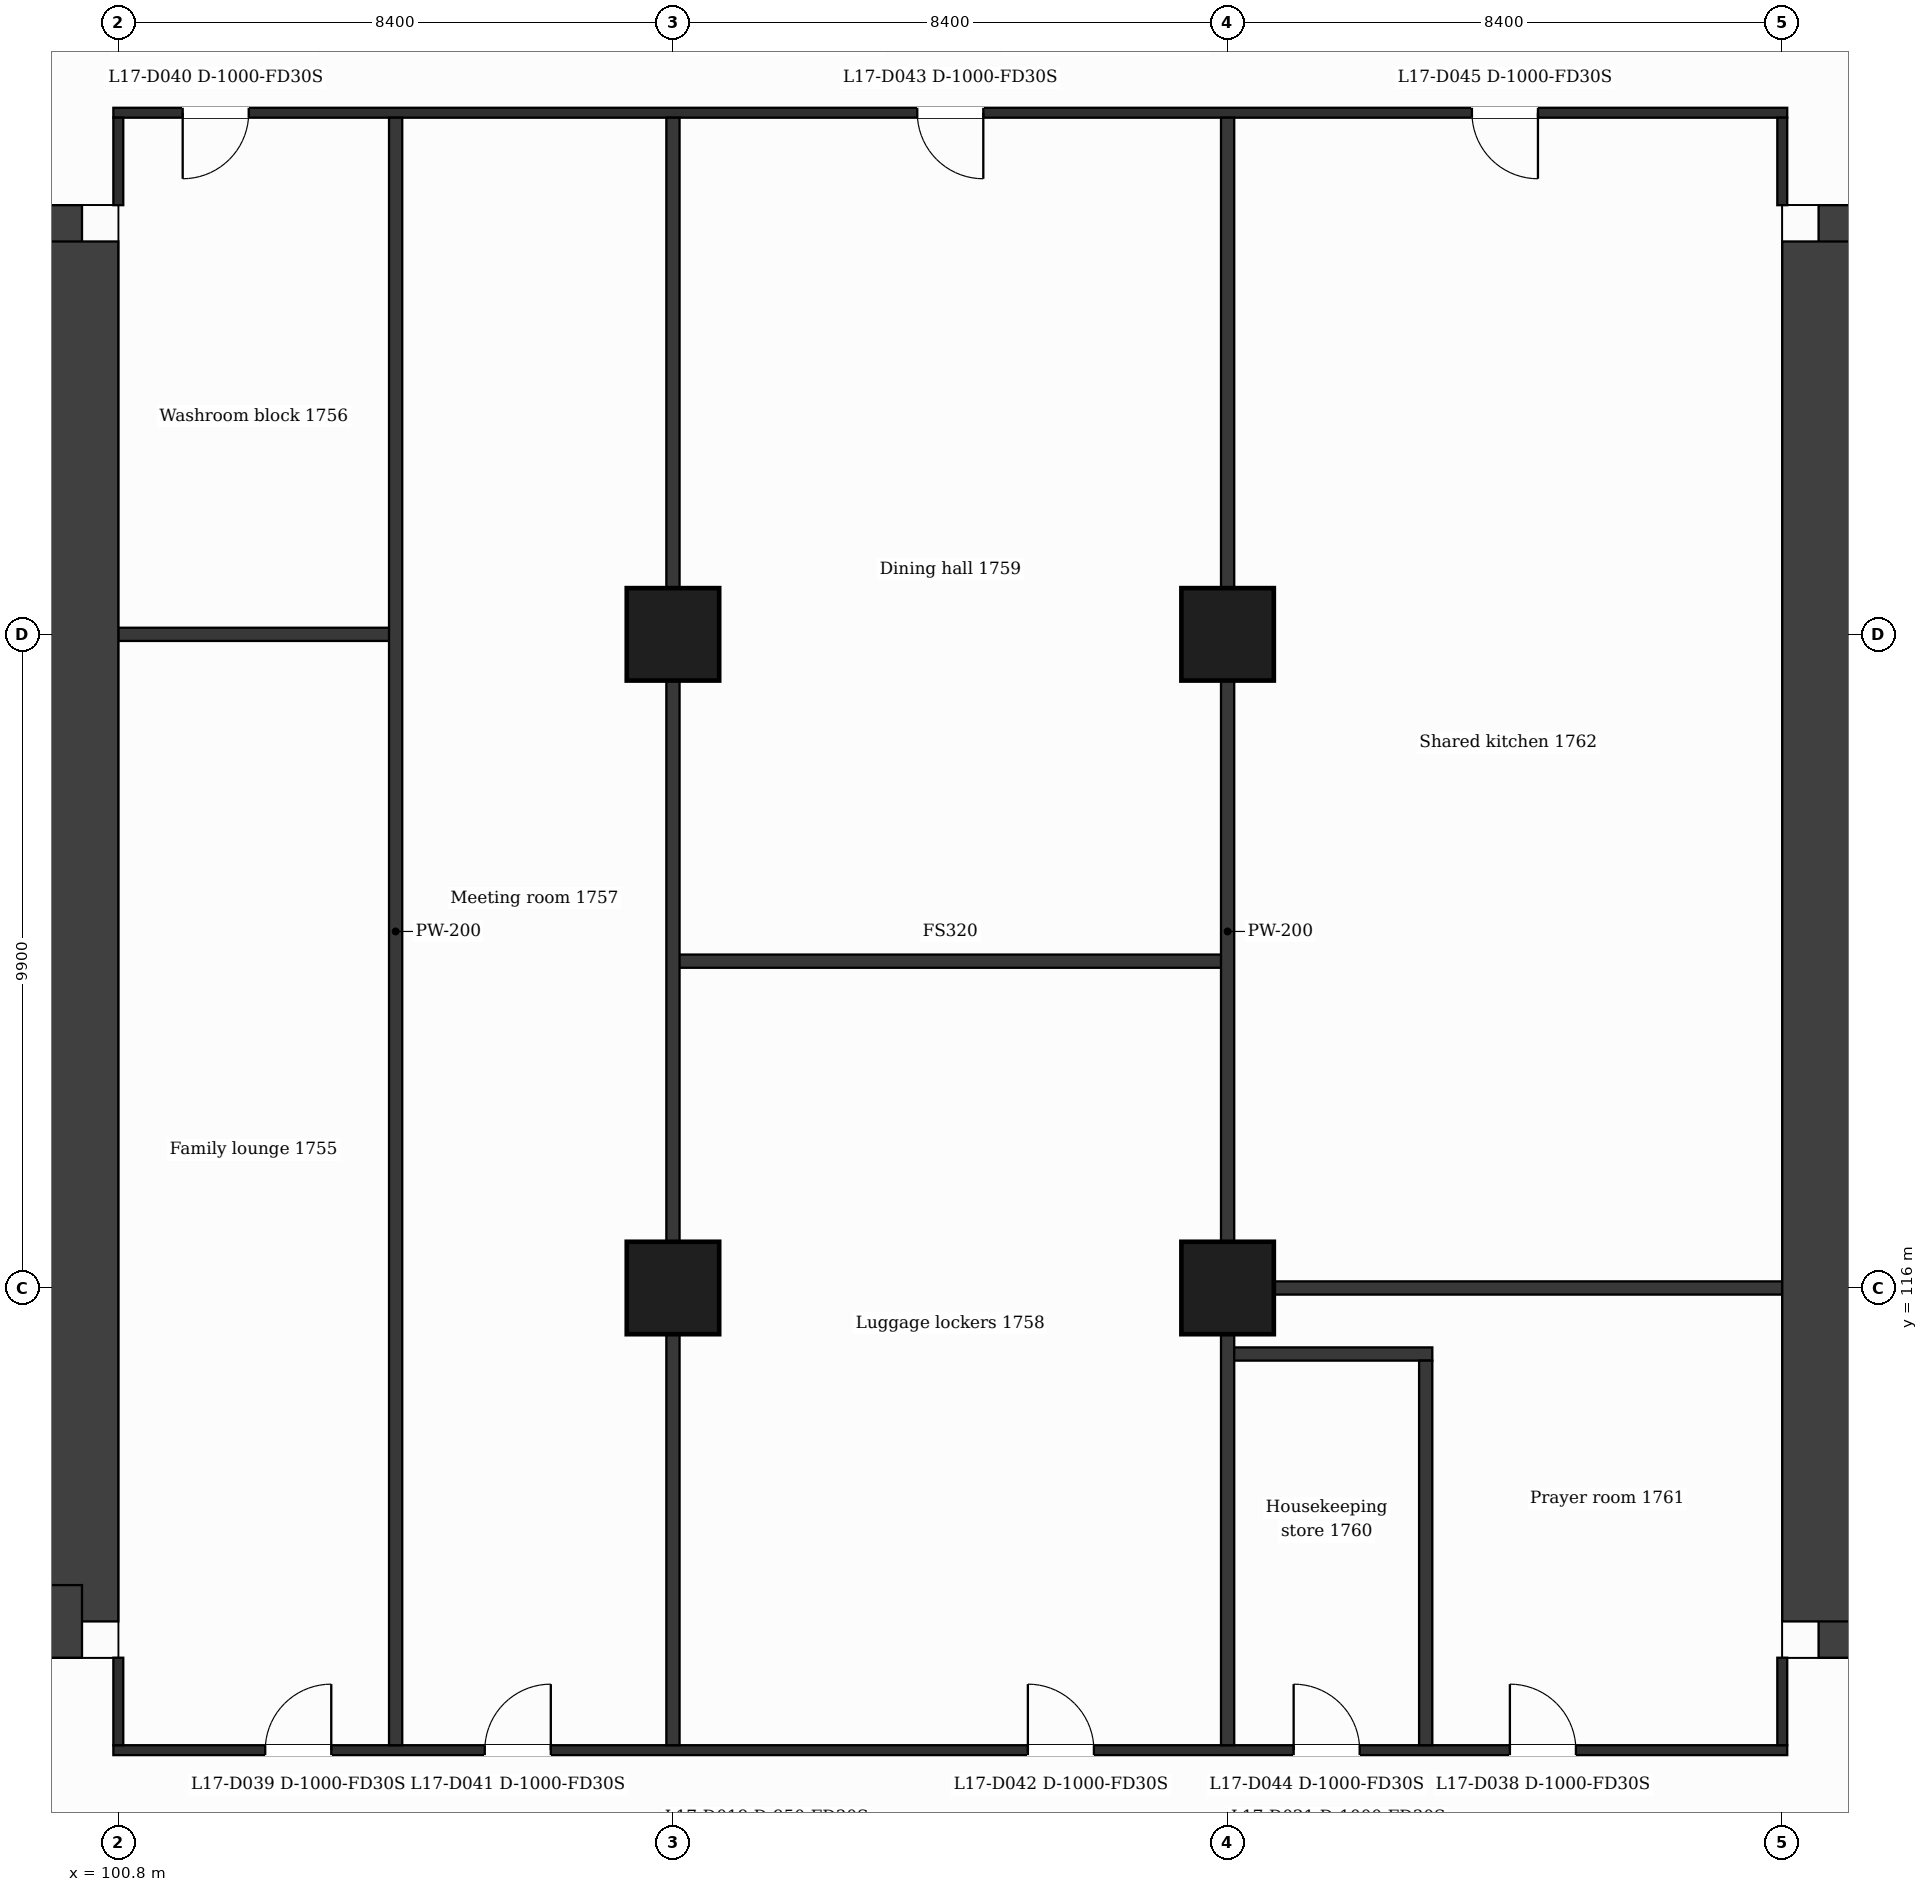
"""IFC4 building model, lengths in metres.
Left out: names, types, materials, properties, quantities, classifications, styles, units other than length and angle.
Written with IfcOpenShell. Run it as: python <this file> out.ifc"""

import sys

from ifc_helpers import new_model, si_unit, direction, frame, frame_2d, origin, origin_2d, place, context, subcontext, project, spatial, rectangle, extrude, element, fill, save


model = new_model("IFC4")
c1 = context("Model", 3, precision=1e-05, world=origin(), true_north=direction((0.0, 1.0)))
c2 = subcontext(c1, "Body", "Model", "MODEL_VIEW")
j1 = project(units=[si_unit("LENGTHUNIT", "METRE"), si_unit("PLANEANGLEUNIT", "RADIAN")], contexts=[c1])
p1 = place(None, origin())
s1 = spatial("IfcSite", under=j1, at=p1, CompositionType="ELEMENT")
p2 = place(p1, origin())
s2 = spatial("IfcBuilding", under=s1, at=p2, CompositionType="ELEMENT")
p3 = place(p2, frame((0.0, 0.0, 77.5)))
s3 = spatial("IfcBuildingStorey", under=s2, at=p3, CompositionType="ELEMENT", Elevation=77.5)
p4 = place(p3, frame((89.112, 131.85, 0.0), z_axis=(0.0, 0.0, 1.0), x_axis=(1.0, 0.0, 0.0)))
e1 = element("IfcWall", 1, at=p4, inside=s3, PredefinedType="SHEAR", context=c2, shape_type="SweptSolid", body=[
    extrude(rectangle(XDim=11.138, YDim=1.1, at=frame_2d((5.569, 0.0))), origin(), (0.0, 0.0, 1.0), 3.5),
])
p5 = place(p4, frame((6.552, 0.0, 0.0)))
e2 = element("IfcOpeningElement", 2, at=p5, cuts=e1, PredefinedType="OPENING", context=c2, shape_type="SweptSolid", body=[
    extrude(rectangle(XDim=1.2, YDim=2.1, at=frame_2d((0.6, 1.05))), frame((0.0, 0.56, 0.0), z_axis=(0.0, -1.0, 0.0), x_axis=(1.0, 0.0, 0.0)), (0.0, 0.0, 1.0), 1.12),
])
p6 = place(p3, frame((100.25, 131.85, 0.0), z_axis=(0.0, 0.0, 1.0), x_axis=(0.0, -1.0, 0.0)))
e3 = element("IfcWall", 3, at=p6, inside=s3, PredefinedType="SHEAR", context=c2, shape_type="SweptSolid", body=[
    extrude(rectangle(XDim=20.9, YDim=1.1, at=frame_2d((10.45, 0.0))), origin(), (0.0, 0.0, 1.0), 3.5),
])
p7 = place(p3, frame((100.25, 110.95, 0.0), z_axis=(0.0, 0.0, 1.0), x_axis=(-1.0, 0.0, 0.0)))
e4 = element("IfcWall", 4, at=p7, inside=s3, PredefinedType="SHEAR", context=c2, shape_type="SweptSolid", body=[
    extrude(rectangle(XDim=13.952, YDim=1.1, at=frame_2d((6.976, 0.0))), origin(), (0.0, 0.0, 1.0), 3.5),
])
p8 = place(p7, frame((5.748, 0.0, 0.0)))
e5 = element("IfcOpeningElement", 5, at=p8, cuts=e4, PredefinedType="OPENING", context=c2, shape_type="SweptSolid", body=[
    extrude(rectangle(XDim=1.4, YDim=2.1, at=frame_2d((0.7, 1.05))), frame((0.0, 0.56, 0.0), z_axis=(0.0, -1.0, 0.0), x_axis=(1.0, 0.0, 0.0)), (0.0, 0.0, 1.0), 1.12),
])
p9 = place(p3, frame((126.55, 131.85, 0.0), z_axis=(0.0, 0.0, 1.0), x_axis=(1.0, 0.0, 0.0)))
e6 = element("IfcWall", 6, at=p9, inside=s3, PredefinedType="SHEAR", context=c2, shape_type="SweptSolid", body=[
    extrude(rectangle(XDim=11.138, YDim=1.1, at=frame_2d((5.569, 0.0))), origin(), (0.0, 0.0, 1.0), 3.5),
])
p10 = place(p9, frame((3.386, 0.0, 0.0)))
e7 = element("IfcOpeningElement", 7, at=p10, cuts=e6, PredefinedType="OPENING", context=c2, shape_type="SweptSolid", body=[
    extrude(rectangle(XDim=1.2, YDim=2.1, at=frame_2d((0.6, 1.05))), frame((0.0, 0.56, 0.0), z_axis=(0.0, -1.0, 0.0), x_axis=(1.0, 0.0, 0.0)), (0.0, 0.0, 1.0), 1.12),
])
p11 = place(p3, frame((140.502, 110.95, 0.0), z_axis=(0.0, 0.0, 1.0), x_axis=(-1.0, 0.0, 0.0)))
e8 = element("IfcWall", 8, at=p11, inside=s3, PredefinedType="SHEAR", context=c2, shape_type="SweptSolid", body=[
    extrude(rectangle(XDim=13.952, YDim=1.1, at=frame_2d((6.976, 0.0))), origin(), (0.0, 0.0, 1.0), 3.5),
])
p12 = place(p11, frame((6.804, 0.0, 0.0)))
e9 = element("IfcOpeningElement", 9, at=p12, cuts=e8, PredefinedType="OPENING", context=c2, shape_type="SweptSolid", body=[
    extrude(rectangle(XDim=1.4, YDim=2.1, at=frame_2d((0.7, 1.05))), frame((0.0, 0.56, 0.0), z_axis=(0.0, -1.0, 0.0), x_axis=(1.0, 0.0, 0.0)), (0.0, 0.0, 1.0), 1.12),
])
p13 = place(p3, frame((126.55, 110.95, 0.0), z_axis=(0.0, 0.0, 1.0), x_axis=(0.0, 1.0, 0.0)))
e10 = element("IfcWall", 10, at=p13, inside=s3, PredefinedType="SHEAR", context=c2, shape_type="SweptSolid", body=[
    extrude(rectangle(XDim=20.9, YDim=1.1, at=frame_2d((10.45, 0.0))), origin(), (0.0, 0.0, 1.0), 3.5),
])
for number, where, z_axis, x_axis in (
    (11, (109.2, 116.0, 0.0), (0.0, 0.0, 1.0), (1.0, 0.0, 0.0)),
    (12, (117.6, 116.0, 0.0), (0.0, 0.0, 1.0), (1.0, 0.0, 0.0)),
    (13, (109.2, 125.9, 0.0), (0.0, 0.0, 1.0), (1.0, 0.0, 0.0)),
    (14, (117.6, 125.9, 0.0), (0.0, 0.0, 1.0), (1.0, 0.0, 0.0)),
):
    element("IfcColumn", number, at=place(p3, frame(where, z_axis=z_axis, x_axis=x_axis)), inside=s3, PredefinedType="COLUMN", context=c2, shape_type="SweptSolid", body=[
        extrude(rectangle(XDim=1.4, YDim=1.4, at=origin_2d()), origin(), (0.0, 0.0, 1.0), 3.5),
    ])
p14 = place(p3, frame((100.725, 109.0, 0.0), z_axis=(0.0, 0.0, 1.0), x_axis=(1.0, 0.0, 0.0)))
e15 = element("IfcWall", 15, at=p14, inside=s3, PredefinedType="PARTITIONING", context=c2, shape_type="SweptSolid", body=[
    extrude(rectangle(XDim=25.35, YDim=0.15, at=frame_2d((12.675, 0.0))), origin(), (0.0, 0.0, 1.0), 3.0),
])
p15 = place(p14, frame((21.15, 0.0, 0.0)))
e16 = element("IfcOpeningElement", 16, at=p15, cuts=e15, PredefinedType="OPENING", context=c2, shape_type="SweptSolid", body=[
    extrude(rectangle(XDim=1.0, YDim=2.1, at=frame_2d((0.5, 1.05))), frame((0.0, 0.085, 0.0), z_axis=(0.0, -1.0, 0.0), x_axis=(1.0, 0.0, 0.0)), (0.0, 0.0, 1.0), 0.17),
])
p16 = place(p14, frame((2.3, 0.0, 0.0)))
e17 = element("IfcOpeningElement", 17, at=p16, cuts=e15, PredefinedType="OPENING", context=c2, shape_type="SweptSolid", body=[
    extrude(rectangle(XDim=1.0, YDim=2.1, at=frame_2d((0.5, 1.05))), frame((0.0, 0.085, 0.0), z_axis=(0.0, -1.0, 0.0), x_axis=(1.0, 0.0, 0.0)), (0.0, 0.0, 1.0), 0.17),
])
p17 = place(p14, frame((5.625, 0.0, 0.0)))
e18 = element("IfcOpeningElement", 18, at=p17, cuts=e15, PredefinedType="OPENING", context=c2, shape_type="SweptSolid", body=[
    extrude(rectangle(XDim=1.0, YDim=2.1, at=frame_2d((0.5, 1.05))), frame((0.0, 0.085, 0.0), z_axis=(0.0, -1.0, 0.0), x_axis=(1.0, 0.0, 0.0)), (0.0, 0.0, 1.0), 0.17),
])
p18 = place(p14, frame((13.85, 0.0, 0.0)))
e19 = element("IfcOpeningElement", 19, at=p18, cuts=e15, PredefinedType="OPENING", context=c2, shape_type="SweptSolid", body=[
    extrude(rectangle(XDim=1.0, YDim=2.1, at=frame_2d((0.5, 1.05))), frame((0.0, 0.085, 0.0), z_axis=(0.0, -1.0, 0.0), x_axis=(1.0, 0.0, 0.0)), (0.0, 0.0, 1.0), 0.17),
])
p19 = place(p14, frame((17.875, 0.0, 0.0)))
e20 = element("IfcOpeningElement", 20, at=p19, cuts=e15, PredefinedType="OPENING", context=c2, shape_type="SweptSolid", body=[
    extrude(rectangle(XDim=1.0, YDim=2.1, at=frame_2d((0.5, 1.05))), frame((0.0, 0.085, 0.0), z_axis=(0.0, -1.0, 0.0), x_axis=(1.0, 0.0, 0.0)), (0.0, 0.0, 1.0), 0.17),
])
p20 = place(p3, frame((117.6, 115.0, 0.0), z_axis=(0.0, 0.0, 1.0), x_axis=(1.0, 0.0, 0.0)))
e21 = element("IfcWall", 21, at=p20, inside=s3, PredefinedType="PARTITIONING", context=c2, shape_type="SweptSolid", body=[
    extrude(rectangle(XDim=3.1, YDim=0.2, at=frame_2d((1.55, 0.0))), origin(), (0.0, 0.0, 1.0), 3.0),
])
p21 = place(p3, frame((117.6, 116.0, 0.0), z_axis=(0.0, 0.0, 1.0), x_axis=(1.0, 0.0, 0.0)))
e22 = element("IfcWall", 22, at=p21, inside=s3, PredefinedType="PARTITIONING", context=c2, shape_type="SweptSolid", body=[
    extrude(rectangle(XDim=8.4, YDim=0.2, at=frame_2d((4.2, 0.0))), origin(), (0.0, 0.0, 1.0), 3.0),
])
p22 = place(p3, frame((109.2, 120.95, 0.0), z_axis=(0.0, 0.0, 1.0), x_axis=(1.0, 0.0, 0.0)))
e23 = element("IfcWall", 23, at=p22, inside=s3, PredefinedType="PARTITIONING", context=c2, shape_type="SweptSolid", body=[
    extrude(rectangle(XDim=8.4, YDim=0.2, at=frame_2d((4.2, 0.0))), origin(), (0.0, 0.0, 1.0), 3.0),
])
p23 = place(p3, frame((100.8, 125.9, 0.0), z_axis=(0.0, 0.0, 1.0), x_axis=(1.0, 0.0, 0.0)))
e24 = element("IfcWall", 24, at=p23, inside=s3, PredefinedType="PARTITIONING", context=c2, shape_type="SweptSolid", body=[
    extrude(rectangle(XDim=4.2, YDim=0.2, at=frame_2d((2.1, 0.0))), origin(), (0.0, 0.0, 1.0), 3.0),
])
p24 = place(p3, frame((100.725, 133.8, 0.0), z_axis=(0.0, 0.0, 1.0), x_axis=(1.0, 0.0, 0.0)))
e25 = element("IfcWall", 25, at=p24, inside=s3, PredefinedType="PARTITIONING", context=c2, shape_type="SweptSolid", body=[
    extrude(rectangle(XDim=25.35, YDim=0.15, at=frame_2d((12.675, 0.0))), origin(), (0.0, 0.0, 1.0), 3.0),
])
p25 = place(p24, frame((1.05, 0.0, 0.0)))
e26 = element("IfcOpeningElement", 26, at=p25, cuts=e25, PredefinedType="OPENING", context=c2, shape_type="SweptSolid", body=[
    extrude(rectangle(XDim=1.0, YDim=2.1, at=frame_2d((0.5, 1.05))), frame((0.0, 0.085, 0.0), z_axis=(0.0, -1.0, 0.0), x_axis=(1.0, 0.0, 0.0)), (0.0, 0.0, 1.0), 0.17),
])
p26 = place(p24, frame((12.175, 0.0, 0.0)))
e27 = element("IfcOpeningElement", 27, at=p26, cuts=e25, PredefinedType="OPENING", context=c2, shape_type="SweptSolid", body=[
    extrude(rectangle(XDim=1.0, YDim=2.1, at=frame_2d((0.5, 1.05))), frame((0.0, 0.085, 0.0), z_axis=(0.0, -1.0, 0.0), x_axis=(1.0, 0.0, 0.0)), (0.0, 0.0, 1.0), 0.17),
])
p27 = place(p24, frame((20.575, 0.0, 0.0)))
e28 = element("IfcOpeningElement", 28, at=p27, cuts=e25, PredefinedType="OPENING", context=c2, shape_type="SweptSolid", body=[
    extrude(rectangle(XDim=1.0, YDim=2.1, at=frame_2d((0.5, 1.05))), frame((0.0, 0.085, 0.0), z_axis=(0.0, -1.0, 0.0), x_axis=(1.0, 0.0, 0.0)), (0.0, 0.0, 1.0), 0.17),
])
p28 = place(p3, frame((100.8, 109.075, 0.0), z_axis=(0.0, 0.0, 1.0), x_axis=(0.0, 1.0, 0.0)))
e29 = element("IfcWall", 29, at=p28, inside=s3, PredefinedType="PARTITIONING", context=c2, shape_type="SweptSolid", body=[
    extrude(rectangle(XDim=1.325, YDim=0.15, at=frame_2d((0.663, 0.0))), origin(), (0.0, 0.0, 1.0), 3.0),
])
p29 = place(p3, frame((100.8, 132.4, 0.0), z_axis=(0.0, 0.0, 1.0), x_axis=(0.0, 1.0, 0.0)))
e30 = element("IfcWall", 30, at=p29, inside=s3, PredefinedType="PARTITIONING", context=c2, shape_type="SweptSolid", body=[
    extrude(rectangle(XDim=1.325, YDim=0.15, at=frame_2d((0.663, 0.0))), origin(), (0.0, 0.0, 1.0), 3.0),
])
for number, where, z_axis, x_axis in (
    (31, (105.0, 109.075, 0.0), (0.0, 0.0, 1.0), (0.0, 1.0, 0.0)),
    (32, (109.2, 109.075, 0.0), (0.0, 0.0, 1.0), (0.0, 1.0, 0.0)),
    (33, (117.6, 109.075, 0.0), (0.0, 0.0, 1.0), (0.0, 1.0, 0.0)),
):
    element("IfcWall", number, at=place(p3, frame(where, z_axis=z_axis, x_axis=x_axis)), inside=s3, PredefinedType="PARTITIONING", context=c2, shape_type="SweptSolid", body=[
        extrude(rectangle(XDim=24.65, YDim=0.2, at=frame_2d((12.325, 0.0))), origin(), (0.0, 0.0, 1.0), 3.0),
    ])
p30 = place(p3, frame((120.6, 109.075, 0.0), z_axis=(0.0, 0.0, 1.0), x_axis=(0.0, 1.0, 0.0)))
e34 = element("IfcWall", 34, at=p30, inside=s3, PredefinedType="PARTITIONING", context=c2, shape_type="SweptSolid", body=[
    extrude(rectangle(XDim=5.825, YDim=0.2, at=frame_2d((2.913, 0.0))), origin(), (0.0, 0.0, 1.0), 3.0),
])
p31 = place(p3, frame((126.0, 109.075, 0.0), z_axis=(0.0, 0.0, 1.0), x_axis=(0.0, 1.0, 0.0)))
e35 = element("IfcWall", 35, at=p31, inside=s3, PredefinedType="PARTITIONING", context=c2, shape_type="SweptSolid", body=[
    extrude(rectangle(XDim=1.325, YDim=0.15, at=frame_2d((0.663, 0.0))), origin(), (0.0, 0.0, 1.0), 3.0),
])
p32 = place(p3, frame((126.0, 132.4, 0.0), z_axis=(0.0, 0.0, 1.0), x_axis=(0.0, 1.0, 0.0)))
e36 = element("IfcWall", 36, at=p32, inside=s3, PredefinedType="PARTITIONING", context=c2, shape_type="SweptSolid", body=[
    extrude(rectangle(XDim=1.325, YDim=0.15, at=frame_2d((0.663, 0.0))), origin(), (0.0, 0.0, 1.0), 3.0),
])
p33 = place(p15, origin())
e37 = element("IfcDoor", 37, at=p33, inside=s3, OperationType="SINGLE_SWING_LEFT", PredefinedType="DOOR", context=c2, shape_type="SweptSolid", body=[
    extrude(rectangle(XDim=1.0, YDim=2.1, at=frame_2d((0.5, 1.05))), frame((0.0, 0.025, 0.0), z_axis=(0.0, -1.0, 0.0), x_axis=(1.0, 0.0, 0.0)), (0.0, 0.0, 1.0), 0.05),
])
fill(e16, e37)
p34 = place(p16, origin())
e38 = element("IfcDoor", 38, at=p34, inside=s3, OperationType="SINGLE_SWING_RIGHT", PredefinedType="DOOR", context=c2, shape_type="SweptSolid", body=[
    extrude(rectangle(XDim=1.0, YDim=2.1, at=frame_2d((0.5, 1.05))), frame((0.0, 0.025, 0.0), z_axis=(0.0, -1.0, 0.0), x_axis=(1.0, 0.0, 0.0)), (0.0, 0.0, 1.0), 0.05),
])
fill(e17, e38)
p35 = place(p25, origin())
e39 = element("IfcDoor", 39, at=p35, inside=s3, OperationType="SINGLE_SWING_LEFT", PredefinedType="DOOR", context=c2, shape_type="SweptSolid", body=[
    extrude(rectangle(XDim=1.0, YDim=2.1, at=frame_2d((0.5, 1.05))), frame((0.0, 0.025, 0.0), z_axis=(0.0, -1.0, 0.0), x_axis=(1.0, 0.0, 0.0)), (0.0, 0.0, 1.0), 0.05),
])
fill(e26, e39)
p36 = place(p17, origin())
e40 = element("IfcDoor", 40, at=p36, inside=s3, OperationType="SINGLE_SWING_RIGHT", PredefinedType="DOOR", context=c2, shape_type="SweptSolid", body=[
    extrude(rectangle(XDim=1.0, YDim=2.1, at=frame_2d((0.5, 1.05))), frame((0.0, 0.025, 0.0), z_axis=(0.0, -1.0, 0.0), x_axis=(1.0, 0.0, 0.0)), (0.0, 0.0, 1.0), 0.05),
])
fill(e18, e40)
p37 = place(p18, origin())
e41 = element("IfcDoor", 41, at=p37, inside=s3, OperationType="SINGLE_SWING_LEFT", PredefinedType="DOOR", context=c2, shape_type="SweptSolid", body=[
    extrude(rectangle(XDim=1.0, YDim=2.1, at=frame_2d((0.5, 1.05))), frame((0.0, 0.025, 0.0), z_axis=(0.0, -1.0, 0.0), x_axis=(1.0, 0.0, 0.0)), (0.0, 0.0, 1.0), 0.05),
])
fill(e19, e41)
p38 = place(p26, origin())
e42 = element("IfcDoor", 42, at=p38, inside=s3, OperationType="SINGLE_SWING_RIGHT", PredefinedType="DOOR", context=c2, shape_type="SweptSolid", body=[
    extrude(rectangle(XDim=1.0, YDim=2.1, at=frame_2d((0.5, 1.05))), frame((0.0, 0.025, 0.0), z_axis=(0.0, -1.0, 0.0), x_axis=(1.0, 0.0, 0.0)), (0.0, 0.0, 1.0), 0.05),
])
fill(e27, e42)
p39 = place(p19, origin())
e43 = element("IfcDoor", 43, at=p39, inside=s3, OperationType="SINGLE_SWING_LEFT", PredefinedType="DOOR", context=c2, shape_type="SweptSolid", body=[
    extrude(rectangle(XDim=1.0, YDim=2.1, at=frame_2d((0.5, 1.05))), frame((0.0, 0.025, 0.0), z_axis=(0.0, -1.0, 0.0), x_axis=(1.0, 0.0, 0.0)), (0.0, 0.0, 1.0), 0.05),
])
fill(e20, e43)
p40 = place(p27, origin())
e44 = element("IfcDoor", 44, at=p40, inside=s3, OperationType="SINGLE_SWING_RIGHT", PredefinedType="DOOR", context=c2, shape_type="SweptSolid", body=[
    extrude(rectangle(XDim=1.0, YDim=2.1, at=frame_2d((0.5, 1.05))), frame((0.0, 0.025, 0.0), z_axis=(0.0, -1.0, 0.0), x_axis=(1.0, 0.0, 0.0)), (0.0, 0.0, 1.0), 0.05),
])
fill(e28, e44)
save(model, sys.argv[1])
